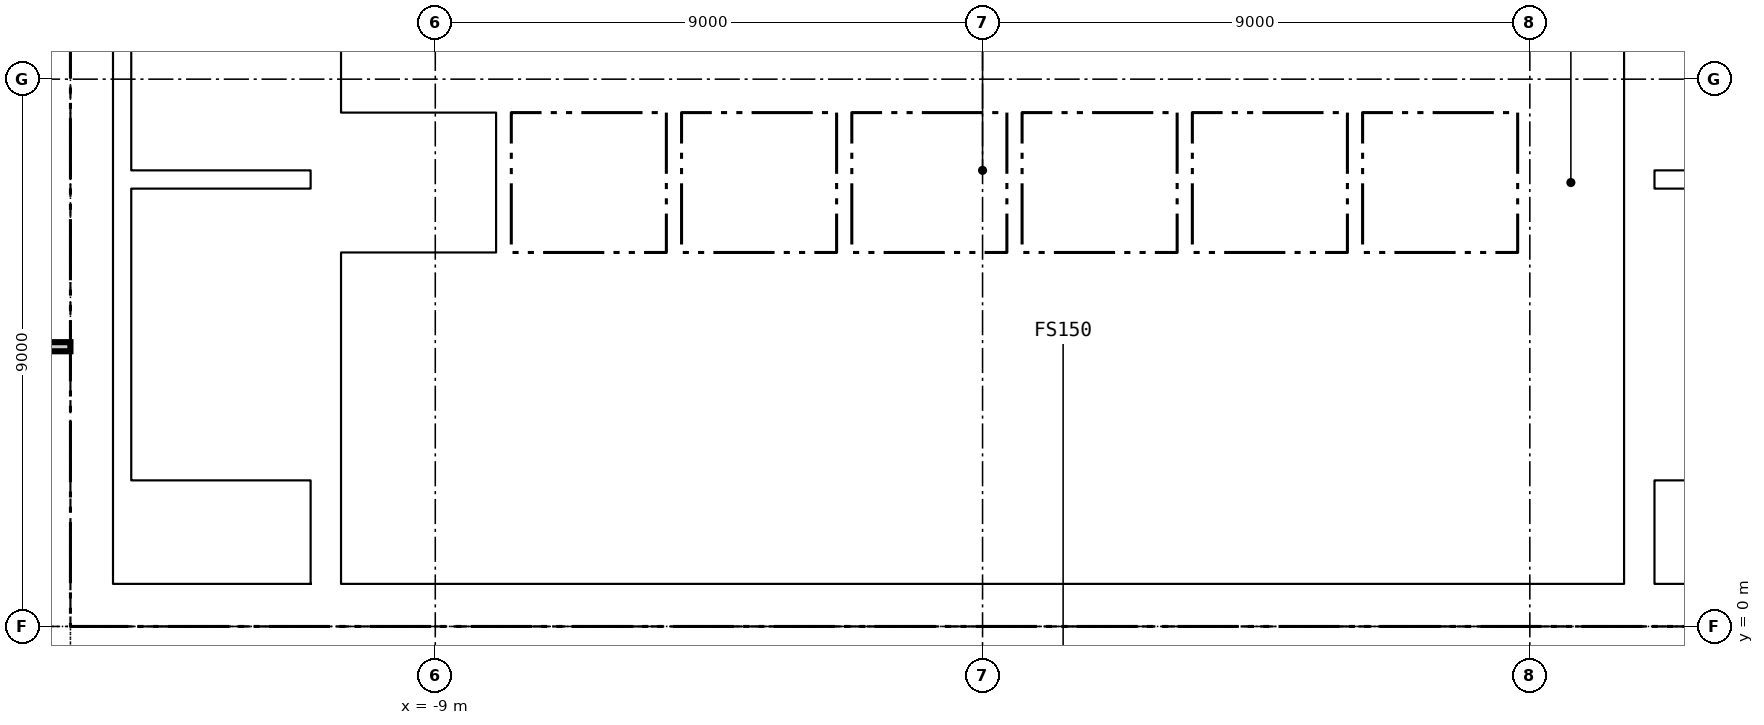
"""IFC4 building model, lengths in metres.
Left out: names, types, materials, properties, quantities, classifications, styles, units other than length and angle.
Written with IfcOpenShell. Run it as: python <this file> out.ifc"""

import sys

from ifc_helpers import new_model, si_unit, direction, frame, frame_2d, origin, place, context, subcontext, project, spatial, rectangle, extrude, element, fill, save


model = new_model("IFC4")
c1 = context("Model", 3, precision=1e-05, world=origin(), true_north=direction((0.0, 1.0)))
c2 = subcontext(c1, "Body", "Model", "MODEL_VIEW")
j1 = project(units=[si_unit("LENGTHUNIT", "METRE"), si_unit("PLANEANGLEUNIT", "RADIAN")], contexts=[c1])
p1 = place(None, origin())
s1 = spatial("IfcSite", under=j1, at=p1, CompositionType="ELEMENT")
p2 = place(p1, origin())
s2 = spatial("IfcBuilding", under=s1, at=p2, CompositionType="ELEMENT")
p3 = place(p2, frame((0.0, 0.0, 170.8)))
s3 = spatial("IfcBuildingStorey", under=s2, at=p3, CompositionType="ELEMENT", Elevation=170.8)
p4 = place(p3, frame((-15.0, 0.35, -0.15), z_axis=(0.0, 0.0, 1.0), x_axis=(1.0, 0.0, 0.0)))
e1 = element("IfcWall", 1, at=p4, inside=s3, PredefinedType="SOLIDWALL", context=c2, shape_type="SweptSolid", body=[
    extrude(rectangle(XDim=30.0, YDim=0.7, at=frame_2d((15.0, 0.0))), origin(), (0.0, 0.0, 1.0), 3.65),
])
p5 = place(p4, frame((5.8, 0.0, 0.15)))
e2 = element("IfcOpeningElement", 2, at=p5, cuts=e1, PredefinedType="OPENING", context=c2, shape_type="SweptSolid", body=[
    extrude(rectangle(XDim=2.4, YDim=2.4, at=frame_2d((1.2, 1.2))), frame((0.0, 0.36, 0.0), z_axis=(0.0, -1.0, 0.0), x_axis=(1.0, 0.0, 0.0)), (0.0, 0.0, 1.0), 0.72),
])
p6 = place(p4, frame((13.8, 0.0, 0.15)))
e3 = element("IfcOpeningElement", 3, at=p6, cuts=e1, PredefinedType="OPENING", context=c2, shape_type="SweptSolid", body=[
    extrude(rectangle(XDim=2.4, YDim=2.4, at=frame_2d((1.2, 1.2))), frame((0.0, 0.36, 0.0), z_axis=(0.0, -1.0, 0.0), x_axis=(1.0, 0.0, 0.0)), (0.0, 0.0, 1.0), 0.72),
])
p7 = place(p4, frame((21.8, 0.0, 0.15)))
e4 = element("IfcOpeningElement", 4, at=p7, cuts=e1, PredefinedType="OPENING", context=c2, shape_type="SweptSolid", body=[
    extrude(rectangle(XDim=2.4, YDim=2.4, at=frame_2d((1.2, 1.2))), frame((0.0, 0.36, 0.0), z_axis=(0.0, -1.0, 0.0), x_axis=(1.0, 0.0, 0.0)), (0.0, 0.0, 1.0), 0.72),
])
p8 = place(p4, frame((1.5, 0.0, 0.15)))
e5 = element("IfcOpeningElement", 5, at=p8, cuts=e1, PredefinedType="OPENING", context=c2, shape_type="SweptSolid", body=[
    extrude(rectangle(XDim=1.2, YDim=2.1, at=frame_2d((0.6, 1.05))), frame((0.0, 0.36, 0.0), z_axis=(0.0, -1.0, 0.0), x_axis=(1.0, 0.0, 0.0)), (0.0, 0.0, 1.0), 0.72),
])
p9 = place(p4, frame((27.3, 0.0, 0.15)))
e6 = element("IfcOpeningElement", 6, at=p9, cuts=e1, PredefinedType="OPENING", context=c2, shape_type="SweptSolid", body=[
    extrude(rectangle(XDim=1.2, YDim=2.1, at=frame_2d((0.6, 1.05))), frame((0.0, 0.36, 0.0), z_axis=(0.0, -1.0, 0.0), x_axis=(1.0, 0.0, 0.0)), (0.0, 0.0, 1.0), 0.72),
])
p10 = place(p3, frame((-14.65, 0.7, -0.15), z_axis=(0.0, 0.0, 1.0), x_axis=(0.0, 1.0, 0.0)))
e7 = element("IfcWall", 7, at=p10, inside=s3, PredefinedType="SOLIDWALL", context=c2, shape_type="SweptSolid", body=[
    extrude(rectangle(XDim=13.6, YDim=0.7, at=frame_2d((6.8, 0.0))), origin(), (0.0, 0.0, 1.0), 3.65),
])
for number, where, z_axis, x_axis in (
    (8, (-10.8, 0.7, -0.15), (0.0, 0.0, 1.0), (0.0, 1.0, 0.0)),
    (9, (10.8, 0.7, -0.15), (0.0, 0.0, 1.0), (0.0, 1.0, 0.0)),
):
    element("IfcWall", number, at=place(p3, frame(where, z_axis=z_axis, x_axis=x_axis)), inside=s3, PredefinedType="SOLIDWALL", context=c2, shape_type="SweptSolid", body=[
        extrude(rectangle(XDim=13.6, YDim=0.5, at=frame_2d((6.8, 0.0))), origin(), (0.0, 0.0, 1.0), 3.65),
    ])
p11 = place(p3, frame((-10.55, 3.5, 0.0), z_axis=(0.0, 0.0, 1.0), x_axis=(1.0, 0.0, 0.0)))
e10 = element("IfcWall", 10, at=p11, inside=s3, PredefinedType="PARTITIONING", context=c2, shape_type="SweptSolid", body=[
    extrude(rectangle(XDim=21.1, YDim=0.2, at=frame_2d((10.55, 0.0))), origin(), (0.0, 0.0, 1.0), 3.5),
])
p12 = place(p11, frame((1.262, 0.0, 0.0)))
e11 = element("IfcOpeningElement", 11, at=p12, cuts=e10, PredefinedType="OPENING", context=c2, shape_type="SweptSolid", body=[
    extrude(rectangle(XDim=1.0, YDim=2.1, at=frame_2d((0.5, 1.05))), frame((0.0, 0.11, 0.0), z_axis=(0.0, -1.0, 0.0), x_axis=(1.0, 0.0, 0.0)), (0.0, 0.0, 1.0), 0.22),
])
p13 = place(p11, frame((6.0, 0.0, 0.0)))
e12 = element("IfcOpeningElement", 12, at=p13, cuts=e10, PredefinedType="OPENING", context=c2, shape_type="SweptSolid", body=[
    extrude(rectangle(XDim=1.0, YDim=2.1, at=frame_2d((0.5, 1.05))), frame((0.0, 0.11, 0.0), z_axis=(0.0, -1.0, 0.0), x_axis=(1.0, 0.0, 0.0)), (0.0, 0.0, 1.0), 0.22),
])
p14 = place(p11, frame((11.1, 0.0, 0.0)))
e13 = element("IfcOpeningElement", 13, at=p14, cuts=e10, PredefinedType="OPENING", context=c2, shape_type="SweptSolid", body=[
    extrude(rectangle(XDim=1.0, YDim=2.1, at=frame_2d((0.5, 1.05))), frame((0.0, 0.11, 0.0), z_axis=(0.0, -1.0, 0.0), x_axis=(1.0, 0.0, 0.0)), (0.0, 0.0, 1.0), 0.22),
])
p15 = place(p11, frame((16.113, 0.0, 0.0)))
e14 = element("IfcOpeningElement", 14, at=p15, cuts=e10, PredefinedType="OPENING", context=c2, shape_type="SweptSolid", body=[
    extrude(rectangle(XDim=1.0, YDim=2.1, at=frame_2d((0.5, 1.05))), frame((0.0, 0.11, 0.0), z_axis=(0.0, -1.0, 0.0), x_axis=(1.0, 0.0, 0.0)), (0.0, 0.0, 1.0), 0.22),
])
p16 = place(p11, frame((19.9, 0.0, 0.0)))
e15 = element("IfcOpeningElement", 15, at=p16, cuts=e10, PredefinedType="OPENING", context=c2, shape_type="SweptSolid", body=[
    extrude(rectangle(XDim=0.9, YDim=2.1, at=frame_2d((0.45, 1.05))), frame((0.0, 0.11, 0.0), z_axis=(0.0, -1.0, 0.0), x_axis=(1.0, 0.0, 0.0)), (0.0, 0.0, 1.0), 0.22),
])
p17 = place(p3, frame((-10.55, 6.025, 0.0), z_axis=(0.0, 0.0, 1.0), x_axis=(1.0, 0.0, 0.0)))
e16 = element("IfcWall", 16, at=p17, inside=s3, PredefinedType="PARTITIONING", context=c2, shape_type="SweptSolid", body=[
    extrude(rectangle(XDim=21.1, YDim=0.25, at=frame_2d((10.55, 0.0))), origin(), (0.0, 0.0, 1.0), 3.5),
])
p18 = place(p3, frame((-10.55, 8.55, 0.0), z_axis=(0.0, 0.0, 1.0), x_axis=(1.0, 0.0, 0.0)))
e17 = element("IfcWall", 17, at=p18, inside=s3, PredefinedType="PARTITIONING", context=c2, shape_type="SweptSolid", body=[
    extrude(rectangle(XDim=21.1, YDim=0.2, at=frame_2d((10.55, 0.0))), origin(), (0.0, 0.0, 1.0), 3.5),
])
p19 = place(p18, frame((0.675, 0.0, 0.0)))
e18 = element("IfcOpeningElement", 18, at=p19, cuts=e17, PredefinedType="OPENING", context=c2, shape_type="SweptSolid", body=[
    extrude(rectangle(XDim=1.2, YDim=2.1, at=frame_2d((0.6, 1.05))), frame((0.0, 0.11, 0.0), z_axis=(0.0, -1.0, 0.0), x_axis=(1.0, 0.0, 0.0)), (0.0, 0.0, 1.0), 0.22),
])
p20 = place(p18, frame((3.475, 0.0, 0.0)))
e19 = element("IfcOpeningElement", 19, at=p20, cuts=e17, PredefinedType="OPENING", context=c2, shape_type="SweptSolid", body=[
    extrude(rectangle(XDim=1.2, YDim=2.1, at=frame_2d((0.6, 1.05))), frame((0.0, 0.11, 0.0), z_axis=(0.0, -1.0, 0.0), x_axis=(1.0, 0.0, 0.0)), (0.0, 0.0, 1.0), 0.22),
])
p21 = place(p18, frame((6.275, 0.0, 0.0)))
e20 = element("IfcOpeningElement", 20, at=p21, cuts=e17, PredefinedType="OPENING", context=c2, shape_type="SweptSolid", body=[
    extrude(rectangle(XDim=1.2, YDim=2.1, at=frame_2d((0.6, 1.05))), frame((0.0, 0.11, 0.0), z_axis=(0.0, -1.0, 0.0), x_axis=(1.0, 0.0, 0.0)), (0.0, 0.0, 1.0), 0.22),
])
p22 = place(p18, frame((9.075, 0.0, 0.0)))
e21 = element("IfcOpeningElement", 21, at=p22, cuts=e17, PredefinedType="OPENING", context=c2, shape_type="SweptSolid", body=[
    extrude(rectangle(XDim=1.2, YDim=2.1, at=frame_2d((0.6, 1.05))), frame((0.0, 0.11, 0.0), z_axis=(0.0, -1.0, 0.0), x_axis=(1.0, 0.0, 0.0)), (0.0, 0.0, 1.0), 0.22),
])
p23 = place(p18, frame((11.875, 0.0, 0.0)))
e22 = element("IfcOpeningElement", 22, at=p23, cuts=e17, PredefinedType="OPENING", context=c2, shape_type="SweptSolid", body=[
    extrude(rectangle(XDim=1.2, YDim=2.1, at=frame_2d((0.6, 1.05))), frame((0.0, 0.11, 0.0), z_axis=(0.0, -1.0, 0.0), x_axis=(1.0, 0.0, 0.0)), (0.0, 0.0, 1.0), 0.22),
])
p24 = place(p18, frame((14.675, 0.0, 0.0)))
e23 = element("IfcOpeningElement", 23, at=p24, cuts=e17, PredefinedType="OPENING", context=c2, shape_type="SweptSolid", body=[
    extrude(rectangle(XDim=1.2, YDim=2.1, at=frame_2d((0.6, 1.05))), frame((0.0, 0.11, 0.0), z_axis=(0.0, -1.0, 0.0), x_axis=(1.0, 0.0, 0.0)), (0.0, 0.0, 1.0), 0.22),
])
p25 = place(p18, frame((17.475, 0.0, 0.0)))
e24 = element("IfcOpeningElement", 24, at=p25, cuts=e17, PredefinedType="OPENING", context=c2, shape_type="SweptSolid", body=[
    extrude(rectangle(XDim=1.2, YDim=2.1, at=frame_2d((0.6, 1.05))), frame((0.0, 0.11, 0.0), z_axis=(0.0, -1.0, 0.0), x_axis=(1.0, 0.0, 0.0)), (0.0, 0.0, 1.0), 0.22),
])
p26 = place(p18, frame((19.9, 0.0, 0.0)))
e25 = element("IfcOpeningElement", 25, at=p26, cuts=e17, PredefinedType="OPENING", context=c2, shape_type="SweptSolid", body=[
    extrude(rectangle(XDim=0.9, YDim=2.1, at=frame_2d((0.45, 1.05))), frame((0.0, 0.11, 0.0), z_axis=(0.0, -1.0, 0.0), x_axis=(1.0, 0.0, 0.0)), (0.0, 0.0, 1.0), 0.22),
])
p27 = place(p3, frame((-4.125, 8.65, 0.0), z_axis=(0.0, 0.0, 1.0), x_axis=(0.0, 1.0, 0.0)))
e26 = element("IfcWall", 26, at=p27, inside=s3, PredefinedType="PARTITIONING", context=c2, shape_type="SweptSolid", body=[
    extrude(rectangle(XDim=2.45, YDim=0.25, at=frame_2d((1.225, 0.0))), origin(), (0.0, 0.0, 1.0), 3.5),
])
p28 = place(p27, frame((0.625, 0.0, 0.0)))
e27 = element("IfcOpeningElement", 27, at=p28, cuts=e26, PredefinedType="OPENING", context=c2, shape_type="SweptSolid", body=[
    extrude(rectangle(XDim=1.2, YDim=2.1, at=frame_2d((0.6, 1.05))), frame((0.0, 0.135, 0.0), z_axis=(0.0, -1.0, 0.0), x_axis=(1.0, 0.0, 0.0)), (0.0, 0.0, 1.0), 0.27),
])
for number, where, z_axis, x_axis in (
    (28, (-6.95, 3.6, 0.0), (0.0, 0.0, 1.0), (0.0, 1.0, 0.0)),
    (29, (-1.15, 3.6, 0.0), (0.0, 0.0, 1.0), (0.0, 1.0, 0.0)),
    (30, (3.25, 3.6, 0.0), (0.0, 0.0, 1.0), (0.0, 1.0, 0.0)),
):
    element("IfcWall", number, at=place(p3, frame(where, z_axis=z_axis, x_axis=x_axis)), inside=s3, PredefinedType="PARTITIONING", context=c2, shape_type="SweptSolid", body=[
        extrude(rectangle(XDim=2.3, YDim=0.15, at=frame_2d((1.15, 0.0))), origin(), (0.0, 0.0, 1.0), 3.5),
    ])
p29 = place(p3, frame((8.925, 3.6, 0.0), z_axis=(0.0, 0.0, 1.0), x_axis=(0.0, 1.0, 0.0)))
e31 = element("IfcWall", 31, at=p29, inside=s3, PredefinedType="PARTITIONING", context=c2, shape_type="SweptSolid", body=[
    extrude(rectangle(XDim=2.3, YDim=0.25, at=frame_2d((1.15, 0.0))), origin(), (0.0, 0.0, 1.0), 3.5),
])
for number, where, z_axis, x_axis in (
    (32, (-7.875, 6.15, 0.0), (0.0, 0.0, 1.0), (0.0, 1.0, 0.0)),
    (33, (-5.075, 6.15, 0.0), (0.0, 0.0, 1.0), (0.0, 1.0, 0.0)),
    (34, (-2.275, 6.15, 0.0), (0.0, 0.0, 1.0), (0.0, 1.0, 0.0)),
    (35, (0.525, 6.15, 0.0), (0.0, 0.0, 1.0), (0.0, 1.0, 0.0)),
    (36, (3.325, 6.15, 0.0), (0.0, 0.0, 1.0), (0.0, 1.0, 0.0)),
    (37, (6.125, 6.15, 0.0), (0.0, 0.0, 1.0), (0.0, 1.0, 0.0)),
    (38, (8.925, 6.15, 0.0), (0.0, 0.0, 1.0), (0.0, 1.0, 0.0)),
):
    element("IfcWall", number, at=place(p3, frame(where, z_axis=z_axis, x_axis=x_axis)), inside=s3, PredefinedType="PARTITIONING", context=c2, shape_type="SweptSolid", body=[
        extrude(rectangle(XDim=2.3, YDim=0.25, at=frame_2d((1.15, 0.0))), origin(), (0.0, 0.0, 1.0), 3.5),
    ])
p30 = place(p3, frame((-14.0, 7.35, 0.0), z_axis=(0.0, 0.0, 1.0), x_axis=(1.0, 0.0, 0.0)))
e39 = element("IfcWall", 39, at=p30, inside=s3, PredefinedType="SOLIDWALL", context=c2, shape_type="SweptSolid", body=[
    extrude(rectangle(XDim=2.95, YDim=0.3, at=frame_2d((1.475, 0.0))), origin(), (0.0, 0.0, 1.0), 3.5),
])
p31 = place(p3, frame((-14.15, 0.7, 0.0), z_axis=(0.0, 0.0, 1.0), x_axis=(0.0, 1.0, 0.0)))
e40 = element("IfcWall", 40, at=p31, inside=s3, PredefinedType="SOLIDWALL", context=c2, shape_type="SweptSolid", body=[
    extrude(rectangle(XDim=13.6, YDim=0.3, at=frame_2d((6.8, 0.0))), origin(), (0.0, 0.0, 1.0), 3.5),
])
p32 = place(p3, frame((11.05, 7.35, 0.0), z_axis=(0.0, 0.0, 1.0), x_axis=(1.0, 0.0, 0.0)))
e41 = element("IfcWall", 41, at=p32, inside=s3, PredefinedType="SOLIDWALL", context=c2, shape_type="SweptSolid", body=[
    extrude(rectangle(XDim=2.95, YDim=0.3, at=frame_2d((1.475, 0.0))), origin(), (0.0, 0.0, 1.0), 3.5),
])
p33 = place(p3, frame((-15.0, 14.239, 0.0), z_axis=(0.0, 0.0, 1.0), x_axis=(-0.467834708812, -0.88381597928, 0.0)))
e42 = element("IfcWall", 42, at=p33, inside=s3, PredefinedType="PARTITIONING", context=c2, shape_type="SweptSolid", body=[
    extrude(rectangle(XDim=7.406, YDim=0.15, at=frame_2d((3.703, 0.0))), origin(), (0.0, 0.0, 1.0), 2.741),
])
p34 = place(p33, frame((3.203, 0.0, 0.0)))
e43 = element("IfcOpeningElement", 43, at=p34, cuts=e42, PredefinedType="OPENING", context=c2, shape_type="SweptSolid", body=[
    extrude(rectangle(XDim=1.0, YDim=2.1, at=frame_2d((0.5, 1.05))), frame((0.0, 0.085, 0.0), z_axis=(0.0, -1.0, 0.0), x_axis=(1.0, 0.0, 0.0)), (0.0, 0.0, 1.0), 0.17),
])
p35 = place(p3, frame((-18.425, 4.6, 0.0), z_axis=(0.0, 0.0, 1.0), x_axis=(1.0, 0.0, 0.0)))
e44 = element("IfcWall", 44, at=p35, inside=s3, PredefinedType="PARTITIONING", context=c2, shape_type="SweptSolid", body=[
    extrude(rectangle(XDim=3.425, YDim=0.15, at=frame_2d((1.712, 0.0))), origin(), (0.0, 0.0, 1.0), 2.741),
])
p36 = place(p28, origin())
e45 = element("IfcDoor", 45, at=p36, inside=s3, OperationType="SINGLE_SWING_LEFT", PredefinedType="DOOR", context=c2, shape_type="SweptSolid", body=[
    extrude(rectangle(XDim=1.2, YDim=2.1, at=frame_2d((0.6, 1.05))), frame((0.0, 0.025, 0.0), z_axis=(0.0, -1.0, 0.0), x_axis=(1.0, 0.0, 0.0)), (0.0, 0.0, 1.0), 0.05),
])
fill(e27, e45)
p37 = place(p12, origin())
e46 = element("IfcDoor", 46, at=p37, inside=s3, OperationType="SINGLE_SWING_LEFT", PredefinedType="DOOR", context=c2, shape_type="SweptSolid", body=[
    extrude(rectangle(XDim=1.0, YDim=2.1, at=frame_2d((0.5, 1.05))), frame((0.0, 0.025, 0.0), z_axis=(0.0, -1.0, 0.0), x_axis=(1.0, 0.0, 0.0)), (0.0, 0.0, 1.0), 0.05),
])
fill(e11, e46)
p38 = place(p13, origin())
e47 = element("IfcDoor", 47, at=p38, inside=s3, OperationType="SINGLE_SWING_RIGHT", PredefinedType="DOOR", context=c2, shape_type="SweptSolid", body=[
    extrude(rectangle(XDim=1.0, YDim=2.1, at=frame_2d((0.5, 1.05))), frame((0.0, 0.025, 0.0), z_axis=(0.0, -1.0, 0.0), x_axis=(1.0, 0.0, 0.0)), (0.0, 0.0, 1.0), 0.05),
])
fill(e12, e47)
p39 = place(p14, origin())
e48 = element("IfcDoor", 48, at=p39, inside=s3, OperationType="SINGLE_SWING_LEFT", PredefinedType="DOOR", context=c2, shape_type="SweptSolid", body=[
    extrude(rectangle(XDim=1.0, YDim=2.1, at=frame_2d((0.5, 1.05))), frame((0.0, 0.025, 0.0), z_axis=(0.0, -1.0, 0.0), x_axis=(1.0, 0.0, 0.0)), (0.0, 0.0, 1.0), 0.05),
])
fill(e13, e48)
p40 = place(p15, origin())
e49 = element("IfcDoor", 49, at=p40, inside=s3, OperationType="SINGLE_SWING_RIGHT", PredefinedType="DOOR", context=c2, shape_type="SweptSolid", body=[
    extrude(rectangle(XDim=1.0, YDim=2.1, at=frame_2d((0.5, 1.05))), frame((0.0, 0.025, 0.0), z_axis=(0.0, -1.0, 0.0), x_axis=(1.0, 0.0, 0.0)), (0.0, 0.0, 1.0), 0.05),
])
fill(e14, e49)
p41 = place(p16, origin())
e50 = element("IfcDoor", 50, at=p41, inside=s3, OperationType="SINGLE_SWING_RIGHT", PredefinedType="DOOR", context=c2, shape_type="SweptSolid", body=[
    extrude(rectangle(XDim=0.9, YDim=2.1, at=frame_2d((0.45, 1.05))), frame((0.0, 0.025, 0.0), z_axis=(0.0, -1.0, 0.0), x_axis=(1.0, 0.0, 0.0)), (0.0, 0.0, 1.0), 0.05),
])
fill(e15, e50)
p42 = place(p19, origin())
e51 = element("IfcDoor", 51, at=p42, inside=s3, OperationType="DOUBLE_DOOR_SLIDING", PredefinedType="DOOR", context=c2, shape_type="SweptSolid", body=[
    extrude(rectangle(XDim=1.2, YDim=2.1, at=frame_2d((0.6, 1.05))), frame((0.0, 0.025, 0.0), z_axis=(0.0, -1.0, 0.0), x_axis=(1.0, 0.0, 0.0)), (0.0, 0.0, 1.0), 0.05),
])
fill(e18, e51)
p43 = place(p20, origin())
e52 = element("IfcDoor", 52, at=p43, inside=s3, OperationType="DOUBLE_DOOR_SLIDING", PredefinedType="DOOR", context=c2, shape_type="SweptSolid", body=[
    extrude(rectangle(XDim=1.2, YDim=2.1, at=frame_2d((0.6, 1.05))), frame((0.0, 0.025, 0.0), z_axis=(0.0, -1.0, 0.0), x_axis=(1.0, 0.0, 0.0)), (0.0, 0.0, 1.0), 0.05),
])
fill(e19, e52)
p44 = place(p21, origin())
e53 = element("IfcDoor", 53, at=p44, inside=s3, OperationType="DOUBLE_DOOR_SLIDING", PredefinedType="DOOR", context=c2, shape_type="SweptSolid", body=[
    extrude(rectangle(XDim=1.2, YDim=2.1, at=frame_2d((0.6, 1.05))), frame((0.0, 0.025, 0.0), z_axis=(0.0, -1.0, 0.0), x_axis=(1.0, 0.0, 0.0)), (0.0, 0.0, 1.0), 0.05),
])
fill(e20, e53)
p45 = place(p22, origin())
e54 = element("IfcDoor", 54, at=p45, inside=s3, OperationType="DOUBLE_DOOR_SLIDING", PredefinedType="DOOR", context=c2, shape_type="SweptSolid", body=[
    extrude(rectangle(XDim=1.2, YDim=2.1, at=frame_2d((0.6, 1.05))), frame((0.0, 0.025, 0.0), z_axis=(0.0, -1.0, 0.0), x_axis=(1.0, 0.0, 0.0)), (0.0, 0.0, 1.0), 0.05),
])
fill(e21, e54)
p46 = place(p23, origin())
e55 = element("IfcDoor", 55, at=p46, inside=s3, OperationType="DOUBLE_DOOR_SLIDING", PredefinedType="DOOR", context=c2, shape_type="SweptSolid", body=[
    extrude(rectangle(XDim=1.2, YDim=2.1, at=frame_2d((0.6, 1.05))), frame((0.0, 0.025, 0.0), z_axis=(0.0, -1.0, 0.0), x_axis=(1.0, 0.0, 0.0)), (0.0, 0.0, 1.0), 0.05),
])
fill(e22, e55)
p47 = place(p24, origin())
e56 = element("IfcDoor", 56, at=p47, inside=s3, OperationType="DOUBLE_DOOR_SLIDING", PredefinedType="DOOR", context=c2, shape_type="SweptSolid", body=[
    extrude(rectangle(XDim=1.2, YDim=2.1, at=frame_2d((0.6, 1.05))), frame((0.0, 0.025, 0.0), z_axis=(0.0, -1.0, 0.0), x_axis=(1.0, 0.0, 0.0)), (0.0, 0.0, 1.0), 0.05),
])
fill(e23, e56)
p48 = place(p25, origin())
e57 = element("IfcDoor", 57, at=p48, inside=s3, OperationType="DOUBLE_DOOR_SLIDING", PredefinedType="DOOR", context=c2, shape_type="SweptSolid", body=[
    extrude(rectangle(XDim=1.2, YDim=2.1, at=frame_2d((0.6, 1.05))), frame((0.0, 0.025, 0.0), z_axis=(0.0, -1.0, 0.0), x_axis=(1.0, 0.0, 0.0)), (0.0, 0.0, 1.0), 0.05),
])
fill(e24, e57)
p49 = place(p26, origin())
e58 = element("IfcDoor", 58, at=p49, inside=s3, OperationType="SINGLE_SWING_RIGHT", PredefinedType="DOOR", context=c2, shape_type="SweptSolid", body=[
    extrude(rectangle(XDim=0.9, YDim=2.1, at=frame_2d((0.45, 1.05))), frame((0.0, 0.025, 0.0), z_axis=(0.0, -1.0, 0.0), x_axis=(1.0, 0.0, 0.0)), (0.0, 0.0, 1.0), 0.05),
])
fill(e25, e58)
p50 = place(p5, origin())
e59 = element("IfcDoor", 59, at=p50, inside=s3, OperationType="DOUBLE_DOOR_DOUBLE_SWING", PredefinedType="DOOR", context=c2, shape_type="SweptSolid", body=[
    extrude(rectangle(XDim=2.4, YDim=2.4, at=frame_2d((1.2, 1.2))), frame((0.0, 0.025, 0.0), z_axis=(0.0, -1.0, 0.0), x_axis=(1.0, 0.0, 0.0)), (0.0, 0.0, 1.0), 0.05),
])
fill(e2, e59)
p51 = place(p6, origin())
e60 = element("IfcDoor", 60, at=p51, inside=s3, OperationType="DOUBLE_DOOR_DOUBLE_SWING", PredefinedType="DOOR", context=c2, shape_type="SweptSolid", body=[
    extrude(rectangle(XDim=2.4, YDim=2.4, at=frame_2d((1.2, 1.2))), frame((0.0, 0.025, 0.0), z_axis=(0.0, -1.0, 0.0), x_axis=(1.0, 0.0, 0.0)), (0.0, 0.0, 1.0), 0.05),
])
fill(e3, e60)
p52 = place(p7, origin())
e61 = element("IfcDoor", 61, at=p52, inside=s3, OperationType="DOUBLE_DOOR_DOUBLE_SWING", PredefinedType="DOOR", context=c2, shape_type="SweptSolid", body=[
    extrude(rectangle(XDim=2.4, YDim=2.4, at=frame_2d((1.2, 1.2))), frame((0.0, 0.025, 0.0), z_axis=(0.0, -1.0, 0.0), x_axis=(1.0, 0.0, 0.0)), (0.0, 0.0, 1.0), 0.05),
])
fill(e4, e61)
p53 = place(p8, origin())
e62 = element("IfcDoor", 62, at=p53, inside=s3, OperationType="SINGLE_SWING_LEFT", PredefinedType="DOOR", context=c2, shape_type="SweptSolid", body=[
    extrude(rectangle(XDim=1.2, YDim=2.1, at=frame_2d((0.6, 1.05))), frame((0.0, 0.025, 0.0), z_axis=(0.0, -1.0, 0.0), x_axis=(1.0, 0.0, 0.0)), (0.0, 0.0, 1.0), 0.05),
])
fill(e5, e62)
save(model, sys.argv[1])
